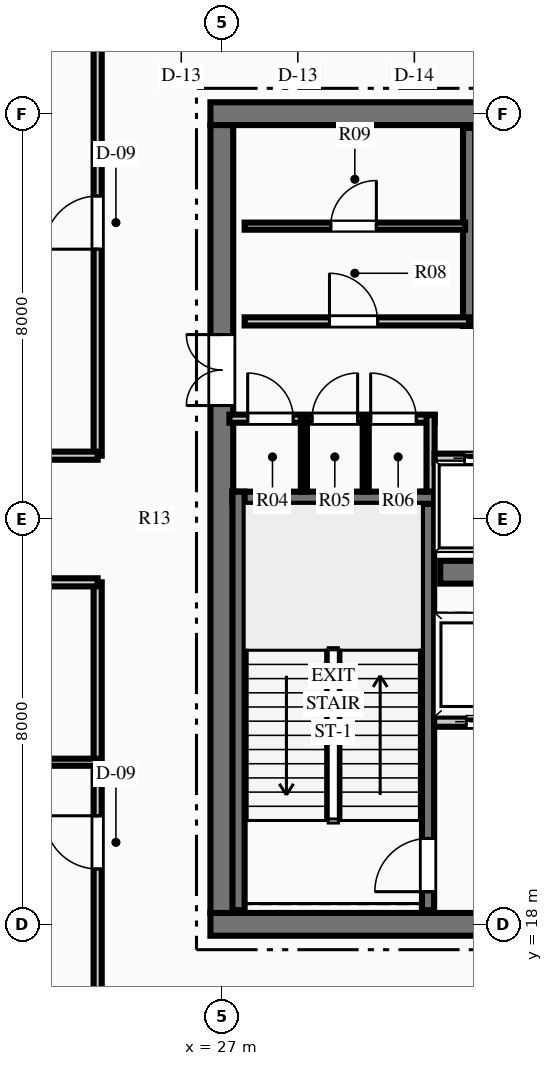
"""IFC4 building model, lengths in metres.
Left out: names, types, materials, properties, quantities, classifications, styles, units other than length and angle.
Written with IfcOpenShell. Run it as: python <this file> out.ifc"""

import sys

from ifc_helpers import new_model, si_unit, direction, frame, frame_2d, origin, place, context, subcontext, project, spatial, rectangle, extrude, element, fill, save


model = new_model("IFC4")
c1 = context("Model", 3, precision=1e-05, world=origin(), true_north=direction((0.0, 1.0)))
c2 = subcontext(c1, "Body", "Model", "MODEL_VIEW")
j1 = project(units=[si_unit("LENGTHUNIT", "METRE"), si_unit("PLANEANGLEUNIT", "RADIAN")], contexts=[c1])
p1 = place(None, origin())
s1 = spatial("IfcSite", under=j1, at=p1, CompositionType="ELEMENT")
p2 = place(p1, origin())
s2 = spatial("IfcBuilding", under=s1, at=p2, CompositionType="ELEMENT")
p3 = place(p2, frame((0.0, 0.0, 347.7)))
s3 = spatial("IfcBuildingStorey", under=s2, at=p3, CompositionType="ELEMENT", Elevation=347.7)
p4 = place(p3, frame((26.775, 18.0, 0.0), z_axis=(0.0, 0.0, 1.0), x_axis=(1.0, 0.0, 0.0)))
e1 = element("IfcWall", 1, at=p4, inside=s3, PredefinedType="SHEAR", context=c2, shape_type="SweptSolid", body=[
    extrude(rectangle(XDim=18.45, YDim=0.45, at=frame_2d((9.225, 0.0))), origin(), (0.0, 0.0, 1.0), 4.5),
])
p5 = place(p4, frame((7.325, 0.0, 0.0)))
e2 = element("IfcOpeningElement", 2, at=p5, cuts=e1, PredefinedType="OPENING", context=c2, shape_type="SweptSolid", body=[
    extrude(rectangle(XDim=1.1, YDim=2.15, at=frame_2d((0.55, 1.075))), frame((0.0, 0.235, 0.0), z_axis=(0.0, -1.0, 0.0), x_axis=(1.0, 0.0, 0.0)), (0.0, 0.0, 1.0), 0.47),
])
p6 = place(p4, frame((10.025, 0.0, 0.0)))
e3 = element("IfcOpeningElement", 3, at=p6, cuts=e1, PredefinedType="OPENING", context=c2, shape_type="SweptSolid", body=[
    extrude(rectangle(XDim=1.1, YDim=2.15, at=frame_2d((0.55, 1.075))), frame((0.0, 0.235, 0.0), z_axis=(0.0, -1.0, 0.0), x_axis=(1.0, 0.0, 0.0)), (0.0, 0.0, 1.0), 0.47),
])
p7 = place(p3, frame((26.775, 34.0, 0.0), z_axis=(0.0, 0.0, 1.0), x_axis=(1.0, 0.0, 0.0)))
e4 = element("IfcWall", 4, at=p7, inside=s3, PredefinedType="SHEAR", context=c2, shape_type="SweptSolid", body=[
    extrude(rectangle(XDim=18.45, YDim=0.45, at=frame_2d((9.225, 0.0))), origin(), (0.0, 0.0, 1.0), 4.5),
])
p8 = place(p3, frame((27.0, 18.225, 0.0), z_axis=(0.0, 0.0, 1.0), x_axis=(0.0, 1.0, 0.0)))
e5 = element("IfcWall", 5, at=p8, inside=s3, PredefinedType="SHEAR", context=c2, shape_type="SweptSolid", body=[
    extrude(rectangle(XDim=15.55, YDim=0.45, at=frame_2d((7.775, 0.0))), origin(), (0.0, 0.0, 1.0), 4.5),
])
p9 = place(p8, frame((10.015, 0.0, 0.0)))
e6 = element("IfcOpeningElement", 6, at=p9, cuts=e5, PredefinedType="OPENING", context=c2, shape_type="SweptSolid", body=[
    extrude(rectangle(XDim=1.4, YDim=2.2, at=frame_2d((0.7, 1.1))), frame((0.0, 0.235, 0.0), z_axis=(0.0, -1.0, 0.0), x_axis=(1.0, 0.0, 0.0)), (0.0, 0.0, 1.0), 0.47),
])
p10 = place(p3, frame((31.31, 24.95, 0.0), z_axis=(0.0, 0.0, 1.0), x_axis=(1.0, 0.0, 0.0)))
e7 = element("IfcWall", 7, at=p10, inside=s3, PredefinedType="SHEAR", context=c2, shape_type="SweptSolid", body=[
    extrude(rectangle(XDim=9.38, YDim=0.45, at=frame_2d((4.69, 0.0))), origin(), (0.0, 0.0, 1.0), 4.5),
])
p11 = place(p3, frame((31.07, 18.28, 0.0), z_axis=(0.0, 0.0, 1.0), x_axis=(0.0, 1.0, 0.0)))
e8 = element("IfcWall", 8, at=p11, inside=s3, PredefinedType="SHEAR", context=c2, shape_type="SweptSolid", body=[
    extrude(rectangle(XDim=8.26, YDim=0.24, at=frame_2d((4.13, 0.0))), origin(), (0.0, 0.0, 1.0), 4.5),
])
p12 = place(p11, frame((0.365, 0.0, 0.0)))
e9 = element("IfcOpeningElement", 9, at=p12, cuts=e8, PredefinedType="OPENING", context=c2, shape_type="SweptSolid", body=[
    extrude(rectangle(XDim=1.05, YDim=2.15, at=frame_2d((0.525, 1.075))), frame((0.0, 0.13, 0.0), z_axis=(0.0, -1.0, 0.0), x_axis=(1.0, 0.0, 0.0)), (0.0, 0.0, 1.0), 0.26),
])
p13 = place(p3, frame((27.21, 26.42, 0.0), z_axis=(0.0, 0.0, 1.0), x_axis=(1.0, 0.0, 0.0)))
e10 = element("IfcWall", 10, at=p13, inside=s3, PredefinedType="SHEAR", context=c2, shape_type="SweptSolid", body=[
    extrude(rectangle(XDim=3.98, YDim=0.24, at=frame_2d((1.99, 0.0))), origin(), (0.0, 0.0, 1.0), 4.5),
])
p14 = place(p3, frame((27.33, 18.28, 0.0), z_axis=(0.0, 0.0, 1.0), x_axis=(0.0, 1.0, 0.0)))
e11 = element("IfcWall", 11, at=p14, inside=s3, PredefinedType="SHEAR", context=c2, shape_type="SweptSolid", body=[
    extrude(rectangle(XDim=8.26, YDim=0.24, at=frame_2d((4.13, 0.0))), origin(), (0.0, 0.0, 1.0), 4.5),
])
p15 = place(p3, frame((31.76, 29.93, 0.0), z_axis=(0.0, 0.0, 1.0), x_axis=(1.0, 0.0, 0.0)))
e12 = element("IfcWall", 12, at=p15, inside=s3, PredefinedType="SHEAR", context=c2, shape_type="SweptSolid", body=[
    extrude(rectangle(XDim=8.38, YDim=0.24, at=frame_2d((4.19, 0.0))), origin(), (0.0, 0.0, 1.0), 4.5),
])
p16 = place(p15, frame((0.565, 0.0, 0.0)))
e13 = element("IfcOpeningElement", 13, at=p16, cuts=e12, PredefinedType="OPENING", context=c2, shape_type="SweptSolid", body=[
    extrude(rectangle(XDim=1.05, YDim=2.15, at=frame_2d((0.525, 1.075))), frame((0.0, 0.13, 0.0), z_axis=(0.0, -1.0, 0.0), x_axis=(1.0, 0.0, 0.0)), (0.0, 0.0, 1.0), 0.26),
])
p17 = place(p3, frame((31.88, 29.93, 0.0), z_axis=(0.0, 0.0, 1.0), x_axis=(0.0, 1.0, 0.0)))
e14 = element("IfcWall", 14, at=p17, inside=s3, PredefinedType="SHEAR", context=c2, shape_type="SweptSolid", body=[
    extrude(rectangle(XDim=3.79, YDim=0.24, at=frame_2d((1.895, 0.0))), origin(), (0.0, 0.0, 1.0), 4.5),
])
p18 = place(p3, frame((31.19, 22.0, 0.0), z_axis=(0.0, 0.0, 1.0), x_axis=(1.0, 0.0, 0.0)))
e15 = element("IfcWall", 15, at=p18, inside=s3, PredefinedType="PARTITIONING", context=c2, shape_type="SweptSolid", body=[
    extrude(rectangle(XDim=4.69, YDim=0.2, at=frame_2d((2.345, 0.0))), origin(), (0.0, 0.0, 1.0), 4.1),
])
p19 = place(p18, frame((2.91, 0.0, 0.0)))
e16 = element("IfcOpeningElement", 16, at=p19, cuts=e15, PredefinedType="OPENING", context=c2, shape_type="SweptSolid", body=[
    extrude(rectangle(XDim=0.9, YDim=2.15, at=frame_2d((0.45, 1.075))), frame((0.0, 0.11, 0.0), z_axis=(0.0, -1.0, 0.0), x_axis=(1.0, 0.0, 0.0)), (0.0, 0.0, 1.0), 0.22),
])
p20 = place(p18, frame((0.635, 0.0, 0.0)))
e17 = element("IfcOpeningElement", 17, at=p20, cuts=e15, PredefinedType="OPENING", context=c2, shape_type="SweptSolid", body=[
    extrude(rectangle(XDim=1.1, YDim=2.15, at=frame_2d((0.55, 1.075))), frame((0.0, 0.11, 0.0), z_axis=(0.0, -1.0, 0.0), x_axis=(1.0, 0.0, 0.0)), (0.0, 0.0, 1.0), 0.22),
])
p21 = place(p3, frame((27.15, 27.98, 0.0), z_axis=(0.0, 0.0, 1.0), x_axis=(1.0, 0.0, 0.0)))
e18 = element("IfcWall", 18, at=p21, inside=s3, PredefinedType="PARTITIONING", context=c2, shape_type="SweptSolid", body=[
    extrude(rectangle(XDim=4.05, YDim=0.16, at=frame_2d((2.025, 0.0))), origin(), (0.0, 0.0, 1.0), 4.1),
])
p22 = place(p21, frame((0.36, 0.0, 0.0)))
e19 = element("IfcOpeningElement", 19, at=p22, cuts=e18, PredefinedType="OPENING", context=c2, shape_type="SweptSolid", body=[
    extrude(rectangle(XDim=0.9, YDim=2.15, at=frame_2d((0.45, 1.075))), frame((0.0, 0.09, 0.0), z_axis=(0.0, -1.0, 0.0), x_axis=(1.0, 0.0, 0.0)), (0.0, 0.0, 1.0), 0.18),
])
p23 = place(p21, frame((1.63, 0.0, 0.0)))
e20 = element("IfcOpeningElement", 20, at=p23, cuts=e18, PredefinedType="OPENING", context=c2, shape_type="SweptSolid", body=[
    extrude(rectangle(XDim=0.9, YDim=2.15, at=frame_2d((0.45, 1.075))), frame((0.0, 0.09, 0.0), z_axis=(0.0, -1.0, 0.0), x_axis=(1.0, 0.0, 0.0)), (0.0, 0.0, 1.0), 0.18),
])
p24 = place(p21, frame((2.788, 0.0, 0.0)))
e21 = element("IfcOpeningElement", 21, at=p24, cuts=e18, PredefinedType="OPENING", context=c2, shape_type="SweptSolid", body=[
    extrude(rectangle(XDim=0.9, YDim=2.15, at=frame_2d((0.45, 1.075))), frame((0.0, 0.09, 0.0), z_axis=(0.0, -1.0, 0.0), x_axis=(1.0, 0.0, 0.0)), (0.0, 0.0, 1.0), 0.18),
])
p25 = place(p3, frame((31.12, 26.54, 0.0), z_axis=(0.0, 0.0, 1.0), x_axis=(0.0, 1.0, 0.0)))
e22 = element("IfcWall", 22, at=p25, inside=s3, PredefinedType="PARTITIONING", context=c2, shape_type="SweptSolid", body=[
    extrude(rectangle(XDim=1.51, YDim=0.16, at=frame_2d((0.755, 0.0))), origin(), (0.0, 0.0, 1.0), 4.1),
])
for number, where, z_axis, x_axis in (
    (23, (28.62, 26.54, 0.0), (0.0, 0.0, 1.0), (0.0, 1.0, 0.0)),
    (24, (29.84, 26.54, 0.0), (0.0, 0.0, 1.0), (0.0, 1.0, 0.0)),
):
    element("IfcWall", number, at=place(p3, frame(where, z_axis=z_axis, x_axis=x_axis)), inside=s3, PredefinedType="PARTITIONING", context=c2, shape_type="SweptSolid", body=[
        extrude(rectangle(XDim=1.44, YDim=0.12, at=frame_2d((0.72, 0.0))), origin(), (0.0, 0.0, 1.0), 4.1),
    ])
p26 = place(p3, frame((27.45, 29.9, 0.0), z_axis=(0.0, 0.0, 1.0), x_axis=(1.0, 0.0, 0.0)))
e25 = element("IfcWall", 25, at=p26, inside=s3, PredefinedType="PARTITIONING", context=c2, shape_type="SweptSolid", body=[
    extrude(rectangle(XDim=4.43, YDim=0.16, at=frame_2d((2.215, 0.0))), origin(), (0.0, 0.0, 1.0), 4.1),
])
p27 = place(p26, frame((1.675, 0.0, 0.0)))
e26 = element("IfcOpeningElement", 26, at=p27, cuts=e25, PredefinedType="OPENING", context=c2, shape_type="SweptSolid", body=[
    extrude(rectangle(XDim=0.95, YDim=2.15, at=frame_2d((0.475, 1.075))), frame((0.0, 0.09, 0.0), z_axis=(0.0, -1.0, 0.0), x_axis=(1.0, 0.0, 0.0)), (0.0, 0.0, 1.0), 0.18),
])
p28 = place(p3, frame((27.45, 31.78, 0.0), z_axis=(0.0, 0.0, 1.0), x_axis=(1.0, 0.0, 0.0)))
e27 = element("IfcWall", 27, at=p28, inside=s3, PredefinedType="PARTITIONING", context=c2, shape_type="SweptSolid", body=[
    extrude(rectangle(XDim=4.35, YDim=0.14, at=frame_2d((2.175, 0.0))), origin(), (0.0, 0.0, 1.0), 4.1),
])
p29 = place(p28, frame((1.7, 0.0, 0.0)))
e28 = element("IfcOpeningElement", 28, at=p29, cuts=e27, PredefinedType="OPENING", context=c2, shape_type="SweptSolid", body=[
    extrude(rectangle(XDim=0.9, YDim=2.15, at=frame_2d((0.45, 1.075))), frame((0.0, 0.08, 0.0), z_axis=(0.0, -1.0, 0.0), x_axis=(1.0, 0.0, 0.0)), (0.0, 0.0, 1.0), 0.16),
])
p30 = place(p3, frame((31.2, 27.2, 0.0), z_axis=(0.0, 0.0, 1.0), x_axis=(1.0, 0.0, 0.0)))
e29 = element("IfcWall", 29, at=p30, inside=s3, PredefinedType="PARTITIONING", context=c2, shape_type="SweptSolid", body=[
    extrude(rectangle(XDim=9.6, YDim=0.18, at=frame_2d((4.8, 0.0))), origin(), (0.0, 0.0, 1.0), 4.1),
])
p31 = place(p30, frame((0.59, 0.0, 0.0)))
e30 = element("IfcOpeningElement", 30, at=p31, cuts=e29, PredefinedType="OPENING", context=c2, shape_type="SweptSolid", body=[
    extrude(rectangle(XDim=1.1, YDim=2.15, at=frame_2d((0.55, 1.075))), frame((0.0, 0.1, 0.0), z_axis=(0.0, -1.0, 0.0), x_axis=(1.0, 0.0, 0.0)), (0.0, 0.0, 1.0), 0.2),
])
p32 = place(p30, frame((2.99, 0.0, 0.0)))
e31 = element("IfcOpeningElement", 31, at=p32, cuts=e29, PredefinedType="OPENING", context=c2, shape_type="SweptSolid", body=[
    extrude(rectangle(XDim=1.1, YDim=2.15, at=frame_2d((0.55, 1.075))), frame((0.0, 0.1, 0.0), z_axis=(0.0, -1.0, 0.0), x_axis=(1.0, 0.0, 0.0)), (0.0, 0.0, 1.0), 0.2),
])
p33 = place(p30, frame((5.51, 0.0, 0.0)))
e32 = element("IfcOpeningElement", 32, at=p33, cuts=e29, PredefinedType="OPENING", context=c2, shape_type="SweptSolid", body=[
    extrude(rectangle(XDim=1.1, YDim=2.15, at=frame_2d((0.55, 1.075))), frame((0.0, 0.1, 0.0), z_axis=(0.0, -1.0, 0.0), x_axis=(1.0, 0.0, 0.0)), (0.0, 0.0, 1.0), 0.2),
])
p34 = place(p30, frame((7.91, 0.0, 0.0)))
e33 = element("IfcOpeningElement", 33, at=p34, cuts=e29, PredefinedType="OPENING", context=c2, shape_type="SweptSolid", body=[
    extrude(rectangle(XDim=1.1, YDim=2.15, at=frame_2d((0.55, 1.075))), frame((0.0, 0.1, 0.0), z_axis=(0.0, -1.0, 0.0), x_axis=(1.0, 0.0, 0.0)), (0.0, 0.0, 1.0), 0.2),
])
p35 = place(p3, frame((24.55, 15.55, 0.0), z_axis=(0.0, 0.0, 1.0), x_axis=(0.0, 1.0, 0.0)))
e34 = element("IfcWall", 34, at=p35, inside=s3, PredefinedType="PARTITIONING", context=c2, shape_type="SweptSolid", body=[
    extrude(rectangle(XDim=9.2, YDim=0.16, at=frame_2d((4.6, 0.0))), origin(), (0.0, 0.0, 1.0), 4.1),
])
p36 = place(p35, frame((3.543, 0.0, 0.0)))
e35 = element("IfcOpeningElement", 35, at=p36, cuts=e34, PredefinedType="OPENING", context=c2, shape_type="SweptSolid", body=[
    extrude(rectangle(XDim=1.05, YDim=2.15, at=frame_2d((0.525, 1.075))), frame((0.0, 0.09, 0.0), z_axis=(0.0, -1.0, 0.0), x_axis=(1.0, 0.0, 0.0)), (0.0, 0.0, 1.0), 0.18),
])
p37 = place(p3, frame((24.55, 27.25, 0.0), z_axis=(0.0, 0.0, 1.0), x_axis=(0.0, 1.0, 0.0)))
e36 = element("IfcWall", 36, at=p37, inside=s3, PredefinedType="PARTITIONING", context=c2, shape_type="SweptSolid", body=[
    extrude(rectangle(XDim=9.2, YDim=0.16, at=frame_2d((4.6, 0.0))), origin(), (0.0, 0.0, 1.0), 4.1),
])
p38 = place(p37, frame((4.075, 0.0, 0.0)))
e37 = element("IfcOpeningElement", 37, at=p38, cuts=e36, PredefinedType="OPENING", context=c2, shape_type="SweptSolid", body=[
    extrude(rectangle(XDim=1.05, YDim=2.15, at=frame_2d((0.525, 1.075))), frame((0.0, 0.09, 0.0), z_axis=(0.0, -1.0, 0.0), x_axis=(1.0, 0.0, 0.0)), (0.0, 0.0, 1.0), 0.18),
])
for number, where, z_axis, x_axis in (
    (38, (17.7, 24.75, 0.0), (0.0, 0.0, 1.0), (1.0, 0.0, 0.0)),
    (39, (17.7, 27.25, 0.0), (0.0, 0.0, 1.0), (1.0, 0.0, 0.0)),
):
    element("IfcWall", number, at=place(p3, frame(where, z_axis=z_axis, x_axis=x_axis)), inside=s3, PredefinedType="PARTITIONING", context=c2, shape_type="SweptSolid", body=[
        extrude(rectangle(XDim=6.85, YDim=0.16, at=frame_2d((3.425, 0.0))), origin(), (0.0, 0.0, 1.0), 4.1),
    ])
p39 = place(p3, frame((14.448, 21.2, 0.0), z_axis=(0.0, 0.0, 1.0), x_axis=(1.0, 0.0, 0.0)))
e40 = element("IfcWall", 40, at=p39, inside=s3, PredefinedType="PARTITIONING", context=c2, shape_type="SweptSolid", body=[
    extrude(rectangle(XDim=10.102, YDim=0.14, at=frame_2d((5.051, 0.0))), origin(), (0.0, 0.0, 1.0), 4.1),
])
p40 = place(p22, origin())
e41 = element("IfcDoor", 41, at=p40, inside=s3, OperationType="SINGLE_SWING_LEFT", PredefinedType="DOOR", context=c2, shape_type="SweptSolid", body=[
    extrude(rectangle(XDim=0.9, YDim=2.15, at=frame_2d((0.45, 1.075))), frame((0.0, 0.025, 0.0), z_axis=(0.0, -1.0, 0.0), x_axis=(1.0, 0.0, 0.0)), (0.0, 0.0, 1.0), 0.05),
])
fill(e19, e41)
p41 = place(p23, origin())
e42 = element("IfcDoor", 42, at=p41, inside=s3, OperationType="SINGLE_SWING_RIGHT", PredefinedType="DOOR", context=c2, shape_type="SweptSolid", body=[
    extrude(rectangle(XDim=0.9, YDim=2.15, at=frame_2d((0.45, 1.075))), frame((0.0, 0.025, 0.0), z_axis=(0.0, -1.0, 0.0), x_axis=(1.0, 0.0, 0.0)), (0.0, 0.0, 1.0), 0.05),
])
fill(e20, e42)
p42 = place(p24, origin())
e43 = element("IfcDoor", 43, at=p42, inside=s3, OperationType="SINGLE_SWING_LEFT", PredefinedType="DOOR", context=c2, shape_type="SweptSolid", body=[
    extrude(rectangle(XDim=0.9, YDim=2.15, at=frame_2d((0.45, 1.075))), frame((0.0, 0.025, 0.0), z_axis=(0.0, -1.0, 0.0), x_axis=(1.0, 0.0, 0.0)), (0.0, 0.0, 1.0), 0.05),
])
fill(e21, e43)
p43 = place(p27, origin())
e44 = element("IfcDoor", 44, at=p43, inside=s3, OperationType="SINGLE_SWING_LEFT", PredefinedType="DOOR", context=c2, shape_type="SweptSolid", body=[
    extrude(rectangle(XDim=0.95, YDim=2.15, at=frame_2d((0.475, 1.075))), frame((0.0, 0.025, 0.0), z_axis=(0.0, -1.0, 0.0), x_axis=(1.0, 0.0, 0.0)), (0.0, 0.0, 1.0), 0.05),
])
fill(e26, e44)
p44 = place(p29, origin())
e45 = element("IfcDoor", 45, at=p44, inside=s3, OperationType="SINGLE_SWING_RIGHT", PredefinedType="DOOR", context=c2, shape_type="SweptSolid", body=[
    extrude(rectangle(XDim=0.9, YDim=2.15, at=frame_2d((0.45, 1.075))), frame((0.0, 0.025, 0.0), z_axis=(0.0, -1.0, 0.0), x_axis=(1.0, 0.0, 0.0)), (0.0, 0.0, 1.0), 0.05),
])
fill(e28, e45)
p45 = place(p12, origin())
e46 = element("IfcDoor", 46, at=p45, inside=s3, OperationType="SINGLE_SWING_LEFT", PredefinedType="DOOR", context=c2, shape_type="SweptSolid", body=[
    extrude(rectangle(XDim=1.05, YDim=2.15, at=frame_2d((0.525, 1.075))), frame((0.0, 0.025, 0.0), z_axis=(0.0, -1.0, 0.0), x_axis=(1.0, 0.0, 0.0)), (0.0, 0.0, 1.0), 0.05),
])
fill(e9, e46)
p46 = place(p9, origin())
e47 = element("IfcDoor", 47, at=p46, inside=s3, OperationType="DOUBLE_DOOR_SINGLE_SWING", PredefinedType="DOOR", context=c2, shape_type="SweptSolid", body=[
    extrude(rectangle(XDim=1.4, YDim=2.2, at=frame_2d((0.7, 1.1))), frame((0.0, 0.025, 0.0), z_axis=(0.0, -1.0, 0.0), x_axis=(1.0, 0.0, 0.0)), (0.0, 0.0, 1.0), 0.05),
])
fill(e6, e47)
p47 = place(p36, origin())
e48 = element("IfcDoor", 48, at=p47, inside=s3, OperationType="SINGLE_SWING_RIGHT", PredefinedType="DOOR", context=c2, shape_type="SweptSolid", body=[
    extrude(rectangle(XDim=1.05, YDim=2.15, at=frame_2d((0.525, 1.075))), frame((0.0, 0.025, 0.0), z_axis=(0.0, -1.0, 0.0), x_axis=(1.0, 0.0, 0.0)), (0.0, 0.0, 1.0), 0.05),
])
fill(e35, e48)
p48 = place(p38, origin())
e49 = element("IfcDoor", 49, at=p48, inside=s3, OperationType="SINGLE_SWING_LEFT", PredefinedType="DOOR", context=c2, shape_type="SweptSolid", body=[
    extrude(rectangle(XDim=1.05, YDim=2.15, at=frame_2d((0.525, 1.075))), frame((0.0, 0.025, 0.0), z_axis=(0.0, -1.0, 0.0), x_axis=(1.0, 0.0, 0.0)), (0.0, 0.0, 1.0), 0.05),
])
fill(e37, e49)
p49 = place(p31, origin())
e50 = element("IfcDoor", 50, at=p49, inside=s3, OperationType="SLIDING_TO_LEFT", PredefinedType="DOOR", context=c2, shape_type="SweptSolid", body=[
    extrude(rectangle(XDim=1.1, YDim=2.15, at=frame_2d((0.55, 1.075))), frame((0.0, 0.025, 0.0), z_axis=(0.0, -1.0, 0.0), x_axis=(1.0, 0.0, 0.0)), (0.0, 0.0, 1.0), 0.05),
])
fill(e30, e50)
p50 = place(p20, origin())
e51 = element("IfcDoor", 51, at=p50, inside=s3, OperationType="SLIDING_TO_LEFT", PredefinedType="DOOR", context=c2, shape_type="SweptSolid", body=[
    extrude(rectangle(XDim=1.1, YDim=2.15, at=frame_2d((0.55, 1.075))), frame((0.0, 0.025, 0.0), z_axis=(0.0, -1.0, 0.0), x_axis=(1.0, 0.0, 0.0)), (0.0, 0.0, 1.0), 0.05),
])
fill(e17, e51)
save(model, sys.argv[1])
